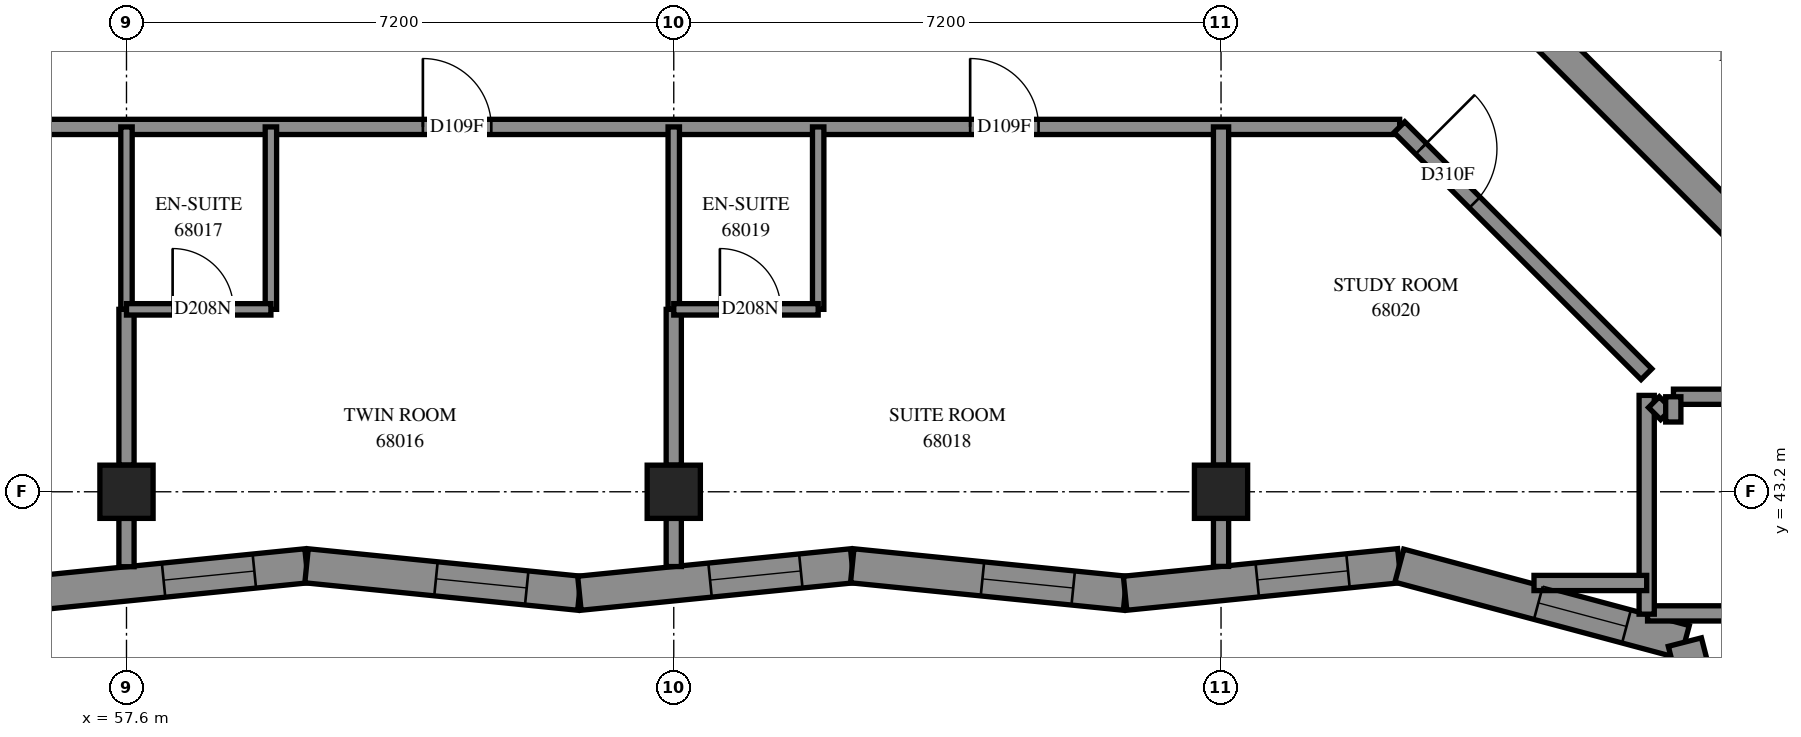
"""IFC4 building model, lengths in metres.
Left out: names, types, materials, properties, quantities, classifications, styles, units other than length and angle.
Written with IfcOpenShell. Run it as: python <this file> out.ifc"""

import sys

from ifc_helpers import new_model, si_unit, direction, frame, frame_2d, origin, origin_2d, place, context, subcontext, project, spatial, polyline, rectangle, outline, extrude, element, fill, save


model = new_model("IFC4")
c1 = context("Model", 3, precision=1e-05, world=origin(), true_north=direction((0.0, 1.0)))
c2 = subcontext(c1, "Body", "Model", "MODEL_VIEW")
j1 = project(units=[si_unit("LENGTHUNIT", "METRE"), si_unit("PLANEANGLEUNIT", "RADIAN")], contexts=[c1])
p1 = place(None, origin())
s1 = spatial("IfcSite", under=j1, at=p1, CompositionType="ELEMENT")
p2 = place(p1, origin())
s2 = spatial("IfcBuilding", under=s1, at=p2, CompositionType="ELEMENT")
p3 = place(p2, frame((0.0, 0.0, 250.6)))
s3 = spatial("IfcBuildingStorey", under=s2, at=p3, CompositionType="ELEMENT", Elevation=250.6)
for number, where, z_axis, x_axis in (
    (1, (57.6, 43.2, 0.0), (0.0, 0.0, 1.0), (1.0, 0.0, 0.0)),
    (2, (64.8, 43.2, 0.0), (0.0, 0.0, 1.0), (1.0, 0.0, 0.0)),
    (3, (72.0, 43.2, 0.0), (0.0, 0.0, 1.0), (1.0, 0.0, 0.0)),
):
    element("IfcColumn", number, at=place(p3, frame(where, z_axis=z_axis, x_axis=x_axis)), inside=s3, PredefinedType="COLUMN", context=c2, shape_type="SweptSolid", body=[
        extrude(rectangle(XDim=0.7, YDim=0.7, at=origin_2d()), origin(), (0.0, 0.0, 1.0), 3.1),
    ])
p4 = place(p3, frame((76.23, 49.231, -0.3), z_axis=(0.0, 0.0, 1.0), x_axis=(0.7071034917, -0.7071100706, 0.0)))
e4 = element("IfcWall", 4, at=p4, inside=s3, PredefinedType="SHEAR", context=c2, shape_type="SweptSolid", body=[
    extrude(rectangle(XDim=15.2, YDim=0.4, at=frame_2d((7.6, 0.0))), origin(), (0.0, 0.0, 1.0), 2.7),
])
p5 = place(p3, frame((56.379, 41.865, 0.0), z_axis=(0.0, 0.0, 1.0), x_axis=(0.994981047, 0.1000635608, 0.0)))
e5 = element("IfcWall", 5, at=p5, inside=s3, PredefinedType="SOLIDWALL", context=c2, shape_type="SweptSolid", body=[
    extrude(outline(polyline([(-0.023, -0.225), (3.585, -0.225), (3.63, 0.225), (0.023, 0.225), (-0.023, -0.225)])), origin(), (0.0, 0.0, 1.0), 3.1),
])
p6 = place(p5, frame((1.717, 0.0, 0.45)))
e6 = element("IfcOpeningElement", 6, at=p6, cuts=e5, PredefinedType="OPENING", context=c2, shape_type="SweptSolid", body=[
    extrude(rectangle(XDim=1.2, YDim=2.55, at=frame_2d((0.6, 1.275))), frame((0.0, 0.235, 0.0), z_axis=(0.0, -1.0, 0.0), x_axis=(1.0, 0.0, 0.0)), (0.0, 0.0, 1.0), 0.47),
])
p7 = place(p3, frame((59.969, 42.226, 0.0), z_axis=(0.0, 0.0, 1.0), x_axis=(0.9949813245, -0.1000608012, 0.0)))
e7 = element("IfcWall", 7, at=p7, inside=s3, PredefinedType="SOLIDWALL", context=c2, shape_type="SweptSolid", body=[
    extrude(outline(polyline([(0.023, -0.225), (3.63, -0.225), (3.585, 0.225), (-0.023, 0.225), (0.023, -0.225)])), origin(), (0.0, 0.0, 1.0), 3.1),
])
p8 = place(p7, frame((1.711, 0.0, 0.45)))
e8 = element("IfcOpeningElement", 8, at=p8, cuts=e7, PredefinedType="OPENING", context=c2, shape_type="SweptSolid", body=[
    extrude(rectangle(XDim=1.2, YDim=2.55, at=frame_2d((0.6, 1.275))), frame((0.0, 0.235, 0.0), z_axis=(0.0, -1.0, 0.0), x_axis=(1.0, 0.0, 0.0)), (0.0, 0.0, 1.0), 0.47),
])
p9 = place(p3, frame((63.559, 41.865, 0.0), z_axis=(0.0, 0.0, 1.0), x_axis=(0.994981047, 0.1000635608, 0.0)))
e9 = element("IfcWall", 9, at=p9, inside=s3, PredefinedType="SOLIDWALL", context=c2, shape_type="SweptSolid", body=[
    extrude(outline(polyline([(-0.023, -0.225), (3.585, -0.225), (3.63, 0.225), (0.023, 0.225), (-0.023, -0.225)])), origin(), (0.0, 0.0, 1.0), 3.1),
])
p10 = place(p9, frame((1.728, 0.0, 0.45)))
e10 = element("IfcOpeningElement", 10, at=p10, cuts=e9, PredefinedType="OPENING", context=c2, shape_type="SweptSolid", body=[
    extrude(rectangle(XDim=1.2, YDim=2.55, at=frame_2d((0.6, 1.275))), frame((0.0, 0.235, 0.0), z_axis=(0.0, -1.0, 0.0), x_axis=(1.0, 0.0, 0.0)), (0.0, 0.0, 1.0), 0.47),
])
p11 = place(p3, frame((67.148, 42.226, 0.0), z_axis=(0.0, 0.0, 1.0), x_axis=(0.994981047, -0.1000635608, 0.0)))
e11 = element("IfcWall", 11, at=p11, inside=s3, PredefinedType="SOLIDWALL", context=c2, shape_type="SweptSolid", body=[
    extrude(outline(polyline([(0.023, -0.225), (3.63, -0.225), (3.585, 0.225), (-0.023, 0.225), (0.023, -0.225)])), origin(), (0.0, 0.0, 1.0), 3.1),
])
p12 = place(p11, frame((1.722, 0.0, 0.45)))
e12 = element("IfcOpeningElement", 12, at=p12, cuts=e11, PredefinedType="OPENING", context=c2, shape_type="SweptSolid", body=[
    extrude(rectangle(XDim=1.2, YDim=2.55, at=frame_2d((0.6, 1.275))), frame((0.0, 0.235, 0.0), z_axis=(0.0, -1.0, 0.0), x_axis=(1.0, 0.0, 0.0)), (0.0, 0.0, 1.0), 0.47),
])
p13 = place(p3, frame((70.738, 41.865, 0.0), z_axis=(0.0, 0.0, 1.0), x_axis=(0.9949796866, 0.1000770865, 0.0)))
e13 = element("IfcWall", 13, at=p13, inside=s3, PredefinedType="SOLIDWALL", context=c2, shape_type="SweptSolid", body=[
    extrude(outline(polyline([(-0.023, -0.225), (3.585, -0.225), (3.667, 0.225), (0.023, 0.225), (-0.023, -0.225)])), origin(), (0.0, 0.0, 1.0), 3.1),
])
p14 = place(p13, frame((1.748, 0.0, 0.45)))
e14 = element("IfcOpeningElement", 14, at=p14, cuts=e13, PredefinedType="OPENING", context=c2, shape_type="SweptSolid", body=[
    extrude(rectangle(XDim=1.2, YDim=2.55, at=frame_2d((0.6, 1.275))), frame((0.0, 0.235, 0.0), z_axis=(0.0, -1.0, 0.0), x_axis=(1.0, 0.0, 0.0)), (0.0, 0.0, 1.0), 0.47),
])
p15 = place(p3, frame((74.346, 42.228, 0.0), z_axis=(0.0, 0.0, 1.0), x_axis=(0.9659805223, -0.2586148306, 0.0)))
e15 = element("IfcWall", 15, at=p15, inside=s3, PredefinedType="SOLIDWALL", context=c2, shape_type="SweptSolid", body=[
    extrude(outline(polyline([(0.041, -0.225), (3.757, -0.225), (4.02, 0.225), (-0.041, 0.225), (0.041, -0.225)])), origin(), (0.0, 0.0, 1.0), 3.1),
])
p16 = place(p15, frame((1.894, 0.0, 0.45)))
e16 = element("IfcOpeningElement", 16, at=p16, cuts=e15, PredefinedType="OPENING", context=c2, shape_type="SweptSolid", body=[
    extrude(rectangle(XDim=1.2, YDim=2.55, at=frame_2d((0.6, 1.275))), frame((0.0, 0.235, 0.0), z_axis=(0.0, -1.0, 0.0), x_axis=(1.0, 0.0, 0.0)), (0.0, 0.0, 1.0), 0.47),
])
p17 = place(p3, frame((78.102, 41.222, 0.0), z_axis=(0.0, 0.0, 1.0), x_axis=(0.2482207273, -0.9687034998, 0.0)))
e17 = element("IfcWall", 17, at=p17, inside=s3, PredefinedType="SOLIDWALL", context=c2, shape_type="SweptSolid", body=[
    extrude(outline(polyline([(0.132, -0.225), (4.842, -0.225), (4.587, 0.225), (-0.132, 0.225), (0.132, -0.225)])), origin(), (0.0, 0.0, 1.0), 3.1),
])
p18 = place(p17, frame((0.337, 0.0, 0.45)))
e18 = element("IfcOpeningElement", 18, at=p18, cuts=e17, PredefinedType="OPENING", context=c2, shape_type="SweptSolid", body=[
    extrude(rectangle(XDim=1.2, YDim=2.55, at=frame_2d((0.6, 1.275))), frame((0.0, 0.235, 0.0), z_axis=(0.0, -1.0, 0.0), x_axis=(1.0, 0.0, 0.0)), (0.0, 0.0, 1.0), 0.47),
])
p19 = place(p17, frame((2.431, 0.0, 0.45)))
e19 = element("IfcOpeningElement", 19, at=p19, cuts=e17, PredefinedType="OPENING", context=c2, shape_type="SweptSolid", body=[
    extrude(rectangle(XDim=1.2, YDim=2.55, at=frame_2d((0.6, 1.275))), frame((0.0, 0.235, 0.0), z_axis=(0.0, -1.0, 0.0), x_axis=(1.0, 0.0, 0.0)), (0.0, 0.0, 1.0), 0.47),
])
p20 = place(p3, frame((55.2, 48.0, 0.0), z_axis=(0.0, 0.0, 1.0), x_axis=(1.0, 0.0, 0.0)))
e20 = element("IfcWall", 20, at=p20, inside=s3, PredefinedType="PARTITIONING", context=c2, shape_type="SweptSolid", body=[
    extrude(rectangle(XDim=19.15, YDim=0.2, at=frame_2d((9.575, 0.0))), origin(), (0.0, 0.0, 1.0), 3.1),
])
p21 = place(p20, frame((6.299, 0.0, 0.0)))
e21 = element("IfcOpeningElement", 21, at=p21, cuts=e20, PredefinedType="OPENING", context=c2, shape_type="SweptSolid", body=[
    extrude(rectangle(XDim=0.9, YDim=2.1, at=frame_2d((0.45, 1.05))), frame((0.0, 0.11, 0.0), z_axis=(0.0, -1.0, 0.0), x_axis=(1.0, 0.0, 0.0)), (0.0, 0.0, 1.0), 0.22),
])
p22 = place(p20, frame((13.499, 0.0, 0.0)))
e22 = element("IfcOpeningElement", 22, at=p22, cuts=e20, PredefinedType="OPENING", context=c2, shape_type="SweptSolid", body=[
    extrude(rectangle(XDim=0.9, YDim=2.1, at=frame_2d((0.45, 1.05))), frame((0.0, 0.11, 0.0), z_axis=(0.0, -1.0, 0.0), x_axis=(1.0, 0.0, 0.0)), (0.0, 0.0, 1.0), 0.22),
])
p23 = place(p3, frame((74.347, 47.997, 0.0), z_axis=(0.0, 0.0, 1.0), x_axis=(0.7071067812, -0.7071067812, 0.0)))
e23 = element("IfcWall", 23, at=p23, inside=s3, PredefinedType="PARTITIONING", context=c2, shape_type="SweptSolid", body=[
    extrude(rectangle(XDim=4.596, YDim=0.2, at=frame_2d((2.298, 0.0))), origin(), (0.0, 0.0, 1.0), 3.1),
])
p24 = place(p23, frame((0.401, 0.0, 0.0)))
e24 = element("IfcOpeningElement", 24, at=p24, cuts=e23, PredefinedType="OPENING", context=c2, shape_type="SweptSolid", body=[
    extrude(rectangle(XDim=1.0, YDim=2.1, at=frame_2d((0.5, 1.05))), frame((0.0, 0.11, 0.0), z_axis=(0.0, -1.0, 0.0), x_axis=(1.0, 0.0, 0.0)), (0.0, 0.0, 1.0), 0.22),
])
p25 = place(p3, frame((72.0, 43.55, 0.0), z_axis=(0.0, 0.0, 1.0), x_axis=(0.0, 1.0, 0.0)))
e25 = element("IfcWall", 25, at=p25, inside=s3, PredefinedType="PARTITIONING", context=c2, shape_type="SweptSolid", body=[
    extrude(rectangle(XDim=4.45, YDim=0.2, at=frame_2d((2.225, 0.0))), origin(), (0.0, 0.0, 1.0), 3.1),
])
p26 = place(p3, frame((77.612, 41.6, 0.0), z_axis=(0.0, 0.0, 1.0), x_axis=(1.0, 0.0, 0.0)))
e26 = element("IfcWall", 26, at=p26, inside=s3, PredefinedType="PARTITIONING", context=c2, shape_type="SweptSolid", body=[
    extrude(rectangle(XDim=2.857, YDim=0.2, at=frame_2d((1.428, 0.0))), origin(), (0.0, 0.0, 1.0), 3.1),
])
p27 = place(p3, frame((77.6, 41.59, 0.0), z_axis=(0.0, 0.0, 1.0), x_axis=(0.0, 1.0, 0.0)))
e27 = element("IfcWall", 27, at=p27, inside=s3, PredefinedType="PARTITIONING", context=c2, shape_type="SweptSolid", body=[
    extrude(rectangle(XDim=2.878, YDim=0.2, at=frame_2d((1.439, 0.0))), origin(), (0.0, 0.0, 1.0), 3.1),
])
p28 = place(p3, frame((77.952, 44.45, 0.0), z_axis=(0.0, 0.0, 1.0), x_axis=(1.0, 0.0, 0.0)))
e28 = element("IfcWall", 28, at=p28, inside=s3, PredefinedType="PARTITIONING", context=c2, shape_type="SweptSolid", body=[
    extrude(rectangle(XDim=2.498, YDim=0.2, at=frame_2d((1.249, 0.0))), origin(), (0.0, 0.0, 1.0), 3.1),
])
for number, where, z_axis, x_axis in (
    (29, (59.5, 45.6, 0.0), (0.0, 0.0, 1.0), (0.0, 1.0, 0.0)),
    (30, (57.6, 45.6, 0.0), (0.0, 0.0, 1.0), (0.0, 1.0, 0.0)),
    (31, (66.7, 45.6, 0.0), (0.0, 0.0, 1.0), (0.0, 1.0, 0.0)),
    (32, (64.8, 45.6, 0.0), (0.0, 0.0, 1.0), (0.0, 1.0, 0.0)),
):
    element("IfcWall", number, at=place(p3, frame(where, z_axis=z_axis, x_axis=x_axis)), inside=s3, PredefinedType="PARTITIONING", context=c2, shape_type="SweptSolid", body=[
        extrude(rectangle(XDim=2.4, YDim=0.15, at=frame_2d((1.2, 0.0))), origin(), (0.0, 0.0, 1.0), 3.1),
    ])
for number, where, z_axis, x_axis in (
    (33, (57.6, 43.55, 0.0), (0.0, 0.0, 1.0), (0.0, 1.0, 0.0)),
    (34, (64.8, 43.55, 0.0), (0.0, 0.0, 1.0), (0.0, 1.0, 0.0)),
):
    element("IfcWall", number, at=place(p3, frame(where, z_axis=z_axis, x_axis=x_axis)), inside=s3, PredefinedType="PARTITIONING", context=c2, shape_type="SweptSolid", body=[
        extrude(rectangle(XDim=2.05, YDim=0.2, at=frame_2d((1.025, 0.0))), origin(), (0.0, 0.0, 1.0), 3.1),
    ])
p29 = place(p3, frame((64.8, 45.6, 0.0), z_axis=(0.0, 0.0, 1.0), x_axis=(1.0, 0.0, 0.0)))
e35 = element("IfcWall", 35, at=p29, inside=s3, PredefinedType="PARTITIONING", context=c2, shape_type="SweptSolid", body=[
    extrude(rectangle(XDim=1.9, YDim=0.15, at=frame_2d((0.95, 0.0))), origin(), (0.0, 0.0, 1.0), 3.1),
])
p30 = place(p29, frame((0.607, 0.0, 0.0)))
e36 = element("IfcOpeningElement", 36, at=p30, cuts=e35, PredefinedType="OPENING", context=c2, shape_type="SweptSolid", body=[
    extrude(rectangle(XDim=0.8, YDim=2.1, at=frame_2d((0.4, 1.05))), frame((0.0, 0.085, 0.0), z_axis=(0.0, -1.0, 0.0), x_axis=(1.0, 0.0, 0.0)), (0.0, 0.0, 1.0), 0.17),
])
p31 = place(p3, frame((57.6, 45.6, 0.0), z_axis=(0.0, 0.0, 1.0), x_axis=(1.0, 0.0, 0.0)))
e37 = element("IfcWall", 37, at=p31, inside=s3, PredefinedType="PARTITIONING", context=c2, shape_type="SweptSolid", body=[
    extrude(rectangle(XDim=1.9, YDim=0.15, at=frame_2d((0.95, 0.0))), origin(), (0.0, 0.0, 1.0), 3.1),
])
p32 = place(p31, frame((0.607, 0.0, 0.0)))
e38 = element("IfcOpeningElement", 38, at=p32, cuts=e37, PredefinedType="OPENING", context=c2, shape_type="SweptSolid", body=[
    extrude(rectangle(XDim=0.8, YDim=2.1, at=frame_2d((0.4, 1.05))), frame((0.0, 0.085, 0.0), z_axis=(0.0, -1.0, 0.0), x_axis=(1.0, 0.0, 0.0)), (0.0, 0.0, 1.0), 0.17),
])
p33 = place(p3, frame((76.117, 42.0, 0.0), z_axis=(0.0, 0.0, 1.0), x_axis=(1.0, 0.0, 0.0)))
e39 = element("IfcWall", 39, at=p33, inside=s3, PredefinedType="PARTITIONING", context=c2, shape_type="SweptSolid", body=[
    extrude(rectangle(XDim=1.483, YDim=0.2, at=frame_2d((0.741, 0.0))), origin(), (0.0, 0.0, 1.0), 3.1),
])
p34 = place(p3, frame((57.6, 42.214, 0.0), z_axis=(0.0, 0.0, 1.0), x_axis=(0.0, 1.0, 0.0)))
e40 = element("IfcWall", 40, at=p34, inside=s3, PredefinedType="PARTITIONING", context=c2, shape_type="SweptSolid", body=[
    extrude(rectangle(XDim=0.636, YDim=0.2, at=frame_2d((0.318, 0.0))), origin(), (0.0, 0.0, 1.0), 3.1),
])
p35 = place(p3, frame((64.8, 42.216, 0.0), z_axis=(0.0, 0.0, 1.0), x_axis=(0.0, 1.0, 0.0)))
e41 = element("IfcWall", 41, at=p35, inside=s3, PredefinedType="PARTITIONING", context=c2, shape_type="SweptSolid", body=[
    extrude(rectangle(XDim=0.634, YDim=0.2, at=frame_2d((0.317, 0.0))), origin(), (0.0, 0.0, 1.0), 3.1),
])
p36 = place(p3, frame((72.0, 42.218, 0.0), z_axis=(0.0, 0.0, 1.0), x_axis=(0.0, 1.0, 0.0)))
e42 = element("IfcWall", 42, at=p36, inside=s3, PredefinedType="PARTITIONING", context=c2, shape_type="SweptSolid", body=[
    extrude(rectangle(XDim=0.632, YDim=0.2, at=frame_2d((0.316, 0.0))), origin(), (0.0, 0.0, 1.0), 3.1),
])
p37 = place(p3, frame((77.695, 44.38, 0.0), z_axis=(0.0, 0.0, 1.0), x_axis=(0.707329037, -0.7068844555, 0.0)))
e43 = element("IfcWall", 43, at=p37, inside=s3, PredefinedType="PARTITIONING", context=c2, shape_type="SweptSolid", body=[
    extrude(rectangle(XDim=0.225, YDim=0.2, at=frame_2d((0.112, 0.0))), origin(), (0.0, 0.0, 1.0), 3.1),
])
p38 = place(p3, frame((77.95, 44.118, 0.0), z_axis=(0.0, 0.0, 1.0), x_axis=(0.0, 1.0, 0.0)))
e44 = element("IfcWall", 44, at=p38, inside=s3, PredefinedType="PARTITIONING", context=c2, shape_type="SweptSolid", body=[
    extrude(rectangle(XDim=0.332, YDim=0.2, at=frame_2d((0.166, 0.0))), origin(), (0.0, 0.0, 1.0), 3.1),
])
p39 = place(p6, origin())
e45 = element("IfcWindow", 45, at=p39, inside=s3, PartitioningType="SINGLE_PANEL", PredefinedType="WINDOW", context=c2, shape_type="SweptSolid", body=[
    extrude(rectangle(XDim=1.2, YDim=2.55, at=frame_2d((0.6, 1.275))), frame((0.0, 0.205, 0.0), z_axis=(0.0, -1.0, 0.0), x_axis=(1.0, 0.0, 0.0)), (0.0, 0.0, 1.0), 0.06),
])
fill(e6, e45)
p40 = place(p8, origin())
e46 = element("IfcWindow", 46, at=p40, inside=s3, PartitioningType="SINGLE_PANEL", PredefinedType="WINDOW", context=c2, shape_type="SweptSolid", body=[
    extrude(rectangle(XDim=1.2, YDim=2.55, at=frame_2d((0.6, 1.275))), frame((0.0, 0.205, 0.0), z_axis=(0.0, -1.0, 0.0), x_axis=(1.0, 0.0, 0.0)), (0.0, 0.0, 1.0), 0.06),
])
fill(e8, e46)
p41 = place(p10, origin())
e47 = element("IfcWindow", 47, at=p41, inside=s3, PartitioningType="SINGLE_PANEL", PredefinedType="WINDOW", context=c2, shape_type="SweptSolid", body=[
    extrude(rectangle(XDim=1.2, YDim=2.55, at=frame_2d((0.6, 1.275))), frame((0.0, 0.205, 0.0), z_axis=(0.0, -1.0, 0.0), x_axis=(1.0, 0.0, 0.0)), (0.0, 0.0, 1.0), 0.06),
])
fill(e10, e47)
p42 = place(p12, origin())
e48 = element("IfcWindow", 48, at=p42, inside=s3, PartitioningType="SINGLE_PANEL", PredefinedType="WINDOW", context=c2, shape_type="SweptSolid", body=[
    extrude(rectangle(XDim=1.2, YDim=2.55, at=frame_2d((0.6, 1.275))), frame((0.0, 0.205, 0.0), z_axis=(0.0, -1.0, 0.0), x_axis=(1.0, 0.0, 0.0)), (0.0, 0.0, 1.0), 0.06),
])
fill(e12, e48)
p43 = place(p14, origin())
e49 = element("IfcWindow", 49, at=p43, inside=s3, PartitioningType="SINGLE_PANEL", PredefinedType="WINDOW", context=c2, shape_type="SweptSolid", body=[
    extrude(rectangle(XDim=1.2, YDim=2.55, at=frame_2d((0.6, 1.275))), frame((0.0, 0.205, 0.0), z_axis=(0.0, -1.0, 0.0), x_axis=(1.0, 0.0, 0.0)), (0.0, 0.0, 1.0), 0.06),
])
fill(e14, e49)
p44 = place(p16, origin())
e50 = element("IfcWindow", 50, at=p44, inside=s3, PartitioningType="SINGLE_PANEL", PredefinedType="WINDOW", context=c2, shape_type="SweptSolid", body=[
    extrude(rectangle(XDim=1.2, YDim=2.55, at=frame_2d((0.6, 1.275))), frame((0.0, 0.135, 0.0), z_axis=(0.0, -1.0, 0.0), x_axis=(1.0, 0.0, 0.0)), (0.0, 0.0, 1.0), 0.06),
])
fill(e16, e50)
p45 = place(p21, origin())
e51 = element("IfcDoor", 51, at=p45, inside=s3, OperationType="SINGLE_SWING_LEFT", PredefinedType="DOOR", context=c2, shape_type="SweptSolid", body=[
    extrude(rectangle(XDim=0.9, YDim=2.1, at=frame_2d((0.45, 1.05))), frame((0.0, 0.025, 0.0), z_axis=(0.0, -1.0, 0.0), x_axis=(1.0, 0.0, 0.0)), (0.0, 0.0, 1.0), 0.05),
])
fill(e21, e51)
p46 = place(p32, origin())
e52 = element("IfcDoor", 52, at=p46, inside=s3, OperationType="SINGLE_SWING_RIGHT", PredefinedType="DOOR", context=c2, shape_type="SweptSolid", body=[
    extrude(rectangle(XDim=0.8, YDim=2.1, at=frame_2d((0.4, 1.05))), frame((0.0, 0.025, 0.0), z_axis=(0.0, -1.0, 0.0), x_axis=(1.0, 0.0, 0.0)), (0.0, 0.0, 1.0), 0.05),
])
fill(e38, e52)
p47 = place(p22, origin())
e53 = element("IfcDoor", 53, at=p47, inside=s3, OperationType="SINGLE_SWING_LEFT", PredefinedType="DOOR", context=c2, shape_type="SweptSolid", body=[
    extrude(rectangle(XDim=0.9, YDim=2.1, at=frame_2d((0.45, 1.05))), frame((0.0, 0.025, 0.0), z_axis=(0.0, -1.0, 0.0), x_axis=(1.0, 0.0, 0.0)), (0.0, 0.0, 1.0), 0.05),
])
fill(e22, e53)
p48 = place(p30, origin())
e54 = element("IfcDoor", 54, at=p48, inside=s3, OperationType="SINGLE_SWING_RIGHT", PredefinedType="DOOR", context=c2, shape_type="SweptSolid", body=[
    extrude(rectangle(XDim=0.8, YDim=2.1, at=frame_2d((0.4, 1.05))), frame((0.0, 0.025, 0.0), z_axis=(0.0, -1.0, 0.0), x_axis=(1.0, 0.0, 0.0)), (0.0, 0.0, 1.0), 0.05),
])
fill(e36, e54)
p49 = place(p24, origin())
e55 = element("IfcDoor", 55, at=p49, inside=s3, OperationType="SINGLE_SWING_LEFT", PredefinedType="DOOR", context=c2, shape_type="SweptSolid", body=[
    extrude(rectangle(XDim=1.0, YDim=2.1, at=frame_2d((0.5, 1.05))), frame((0.0, 0.025, 0.0), z_axis=(0.0, -1.0, 0.0), x_axis=(1.0, 0.0, 0.0)), (0.0, 0.0, 1.0), 0.05),
])
fill(e24, e55)
save(model, sys.argv[1])
